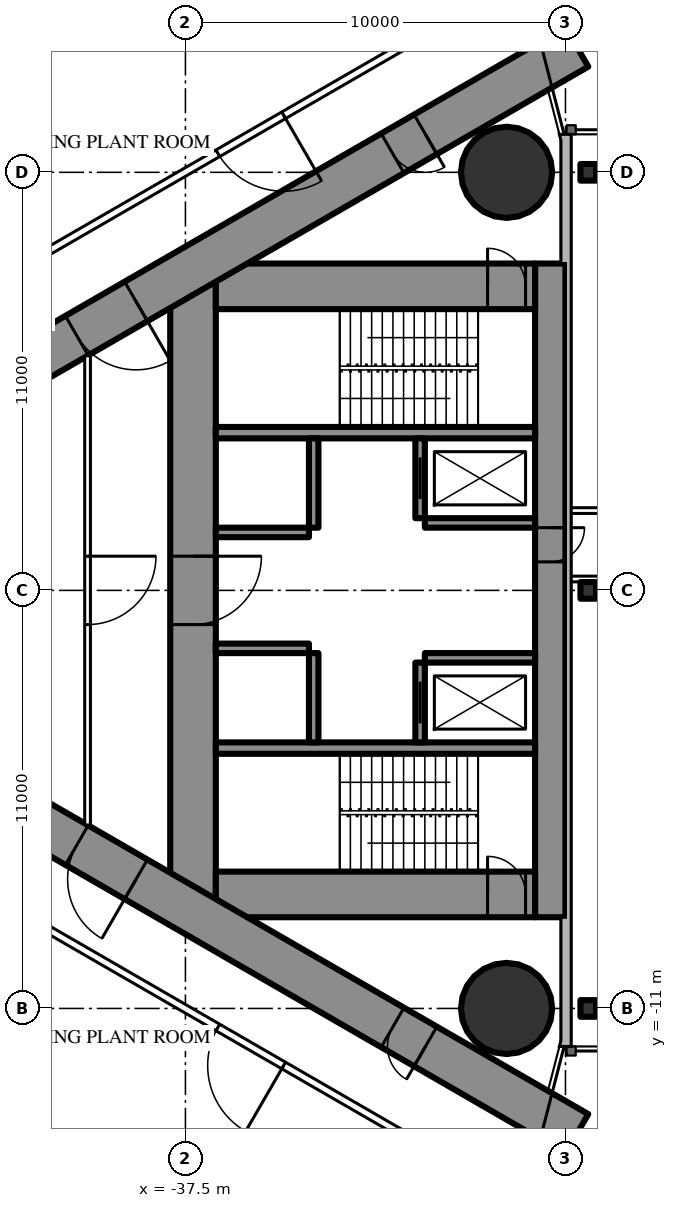
"""IFC4 building model, lengths in metres.
Left out: names, types, materials, properties, quantities, classifications, styles, units other than length and angle.
Written with IfcOpenShell. Run it as: python <this file> out.ifc"""

import sys

from ifc_helpers import new_model, si_unit, direction, frame, frame_2d, origin, origin_2d, place, context, subcontext, project, spatial, rectangle, circle, i_section, extrude, element, fill, save


model = new_model("IFC4")
c1 = context("Model", 3, precision=1e-05, world=origin(), true_north=direction((0.0, 1.0)))
c2 = subcontext(c1, "Body", "Model", "MODEL_VIEW")
j1 = project(units=[si_unit("LENGTHUNIT", "METRE"), si_unit("PLANEANGLEUNIT", "RADIAN")], contexts=[c1])
p1 = place(None, origin())
s1 = spatial("IfcSite", under=j1, at=p1, CompositionType="ELEMENT")
p2 = place(p1, origin())
s2 = spatial("IfcBuilding", under=s1, at=p2, CompositionType="ELEMENT")
p3 = place(p2, frame((0.0, 0.0, 263.3)))
s3 = spatial("IfcBuildingStorey", under=s2, at=p3, CompositionType="ELEMENT", Elevation=263.3)
for number, where, z_axis, x_axis in (
    (1, (-29.05, -11.0, 0.0), (0.0, 0.0, 1.0), (1.0, 0.0, 0.0)),
    (2, (-29.05, 11.0, 0.0), (0.0, 0.0, 1.0), (1.0, 0.0, 0.0)),
):
    element("IfcColumn", number, at=place(p3, frame(where, z_axis=z_axis, x_axis=x_axis)), inside=s3, PredefinedType="COLUMN", context=c2, shape_type="SweptSolid", body=[
        extrude(circle(Radius=1.2, at=origin_2d()), origin(), (0.0, 0.0, 1.0), 5.0),
    ])
p4 = place(p3, frame((-27.9, 8.6, 0.0), z_axis=(0.0, 0.0, 1.0), x_axis=(0.0, -1.0, 0.0)))
e3 = element("IfcWall", 3, at=p4, inside=s3, PredefinedType="SHEAR", context=c2, shape_type="SweptSolid", body=[
    extrude(rectangle(XDim=17.2, YDim=0.8, at=frame_2d((8.6, 0.0))), origin(), (0.0, 0.0, 1.0), 5.0),
])
p5 = place(p4, frame((6.95, 0.0, 0.0)))
e4 = element("IfcOpeningElement", 4, at=p5, cuts=e3, PredefinedType="OPENING", context=c2, shape_type="SweptSolid", body=[
    extrude(rectangle(XDim=0.9, YDim=2.2, at=frame_2d((0.45, 1.1))), frame((0.0, 0.41, 0.0), z_axis=(0.0, -1.0, 0.0), x_axis=(1.0, 0.0, 0.0)), (0.0, 0.0, 1.0), 0.82),
])
p6 = place(p3, frame((-37.3, 8.6, 0.0), z_axis=(0.0, 0.0, 1.0), x_axis=(0.0, -1.0, 0.0)))
e5 = element("IfcWall", 5, at=p6, inside=s3, PredefinedType="SHEAR", context=c2, shape_type="SweptSolid", body=[
    extrude(rectangle(XDim=17.2, YDim=1.2, at=frame_2d((8.6, 0.0))), origin(), (0.0, 0.0, 1.0), 5.0),
])
p7 = place(p6, frame((7.7, 0.0, 0.0)))
e6 = element("IfcOpeningElement", 6, at=p7, cuts=e5, PredefinedType="OPENING", context=c2, shape_type="SweptSolid", body=[
    extrude(rectangle(XDim=1.8, YDim=2.2, at=frame_2d((0.9, 1.1))), frame((0.0, 0.61, 0.0), z_axis=(0.0, -1.0, 0.0), x_axis=(1.0, 0.0, 0.0)), (0.0, 0.0, 1.0), 1.22),
])
p8 = place(p3, frame((-28.3, 8.0, 0.0), z_axis=(0.0, 0.0, 1.0), x_axis=(-1.0, 0.0, 0.0)))
e7 = element("IfcWall", 7, at=p8, inside=s3, PredefinedType="SHEAR", context=c2, shape_type="SweptSolid", body=[
    extrude(rectangle(XDim=8.4, YDim=1.2, at=frame_2d((4.2, 0.0))), origin(), (0.0, 0.0, 1.0), 5.0),
])
p9 = place(p8, frame((0.25, 0.0, 0.0)))
e8 = element("IfcOpeningElement", 8, at=p9, cuts=e7, PredefinedType="OPENING", context=c2, shape_type="SweptSolid", body=[
    extrude(rectangle(XDim=1.0, YDim=2.2, at=frame_2d((0.5, 1.1))), frame((0.0, 0.61, 0.0), z_axis=(0.0, -1.0, 0.0), x_axis=(1.0, 0.0, 0.0)), (0.0, 0.0, 1.0), 1.22),
])
p10 = place(p3, frame((-28.3, -8.0, 0.0), z_axis=(0.0, 0.0, 1.0), x_axis=(-1.0, 0.0, 0.0)))
e9 = element("IfcWall", 9, at=p10, inside=s3, PredefinedType="SHEAR", context=c2, shape_type="SweptSolid", body=[
    extrude(rectangle(XDim=8.4, YDim=1.2, at=frame_2d((4.2, 0.0))), origin(), (0.0, 0.0, 1.0), 5.0),
])
p11 = place(p10, frame((0.25, 0.0, 0.0)))
e10 = element("IfcOpeningElement", 10, at=p11, cuts=e9, PredefinedType="OPENING", context=c2, shape_type="SweptSolid", body=[
    extrude(rectangle(XDim=1.0, YDim=2.2, at=frame_2d((0.5, 1.1))), frame((0.0, 0.61, 0.0), z_axis=(0.0, -1.0, 0.0), x_axis=(1.0, 0.0, 0.0)), (0.0, 0.0, 1.0), 1.22),
])
for number, where, z_axis, x_axis in (
    (11, (-28.3, 4.15, 0.0), (0.0, 0.0, 1.0), (-1.0, 0.0, 0.0)),
    (12, (-28.3, -4.15, 0.0), (0.0, 0.0, 1.0), (-1.0, 0.0, 0.0)),
):
    element("IfcWall", number, at=place(p3, frame(where, z_axis=z_axis, x_axis=x_axis)), inside=s3, PredefinedType="SHEAR", context=c2, shape_type="SweptSolid", body=[
        extrude(rectangle(XDim=8.4, YDim=0.3, at=frame_2d((4.2, 0.0))), origin(), (0.0, 0.0, 1.0), 5.0),
    ])
p12 = place(p3, frame((-31.325, 4.0, 0.0), z_axis=(0.0, 0.0, 1.0), x_axis=(0.0, -1.0, 0.0)))
e13 = element("IfcWall", 13, at=p12, inside=s3, PredefinedType="SHEAR", context=c2, shape_type="SweptSolid", body=[
    extrude(rectangle(XDim=2.1, YDim=0.25, at=frame_2d((1.05, 0.0))), origin(), (0.0, 0.0, 1.0), 5.0),
])
p13 = place(p12, frame((0.5, 0.0, 0.0)))
e14 = element("IfcOpeningElement", 14, at=p13, cuts=e13, PredefinedType="OPENING", context=c2, shape_type="SweptSolid", body=[
    extrude(rectangle(XDim=1.1, YDim=2.2, at=frame_2d((0.55, 1.1))), frame((0.0, 0.135, 0.0), z_axis=(0.0, -1.0, 0.0), x_axis=(1.0, 0.0, 0.0)), (0.0, 0.0, 1.0), 0.27),
])
p14 = place(p3, frame((-34.125, 4.0, 0.0), z_axis=(0.0, 0.0, 1.0), x_axis=(0.0, -1.0, 0.0)))
e15 = element("IfcWall", 15, at=p14, inside=s3, PredefinedType="SHEAR", context=c2, shape_type="SweptSolid", body=[
    extrude(rectangle(XDim=2.35, YDim=0.25, at=frame_2d((1.175, 0.0))), origin(), (0.0, 0.0, 1.0), 5.0),
])
p15 = place(p3, frame((-28.3, 1.775, 0.0), z_axis=(0.0, 0.0, 1.0), x_axis=(-1.0, 0.0, 0.0)))
e16 = element("IfcWall", 16, at=p15, inside=s3, PredefinedType="SHEAR", context=c2, shape_type="SweptSolid", body=[
    extrude(rectangle(XDim=2.9, YDim=0.25, at=frame_2d((1.45, 0.0))), origin(), (0.0, 0.0, 1.0), 5.0),
])
p16 = place(p3, frame((-34.25, 1.525, 0.0), z_axis=(0.0, 0.0, 1.0), x_axis=(-1.0, 0.0, 0.0)))
e17 = element("IfcWall", 17, at=p16, inside=s3, PredefinedType="SHEAR", context=c2, shape_type="SweptSolid", body=[
    extrude(rectangle(XDim=2.45, YDim=0.25, at=frame_2d((1.225, 0.0))), origin(), (0.0, 0.0, 1.0), 5.0),
])
p17 = place(p3, frame((-31.325, -1.9, 0.0), z_axis=(0.0, 0.0, 1.0), x_axis=(0.0, -1.0, 0.0)))
e18 = element("IfcWall", 18, at=p17, inside=s3, PredefinedType="SHEAR", context=c2, shape_type="SweptSolid", body=[
    extrude(rectangle(XDim=2.1, YDim=0.25, at=frame_2d((1.05, 0.0))), origin(), (0.0, 0.0, 1.0), 5.0),
])
p18 = place(p17, frame((0.5, 0.0, 0.0)))
e19 = element("IfcOpeningElement", 19, at=p18, cuts=e18, PredefinedType="OPENING", context=c2, shape_type="SweptSolid", body=[
    extrude(rectangle(XDim=1.1, YDim=2.2, at=frame_2d((0.55, 1.1))), frame((0.0, 0.135, 0.0), z_axis=(0.0, -1.0, 0.0), x_axis=(1.0, 0.0, 0.0)), (0.0, 0.0, 1.0), 0.27),
])
p19 = place(p3, frame((-34.125, -1.65, 0.0), z_axis=(0.0, 0.0, 1.0), x_axis=(0.0, -1.0, 0.0)))
e20 = element("IfcWall", 20, at=p19, inside=s3, PredefinedType="SHEAR", context=c2, shape_type="SweptSolid", body=[
    extrude(rectangle(XDim=2.35, YDim=0.25, at=frame_2d((1.175, 0.0))), origin(), (0.0, 0.0, 1.0), 5.0),
])
p20 = place(p3, frame((-28.3, -1.775, 0.0), z_axis=(0.0, 0.0, 1.0), x_axis=(-1.0, 0.0, 0.0)))
e21 = element("IfcWall", 21, at=p20, inside=s3, PredefinedType="SHEAR", context=c2, shape_type="SweptSolid", body=[
    extrude(rectangle(XDim=2.9, YDim=0.25, at=frame_2d((1.45, 0.0))), origin(), (0.0, 0.0, 1.0), 5.0),
])
p21 = place(p3, frame((-34.25, -1.525, 0.0), z_axis=(0.0, 0.0, 1.0), x_axis=(-1.0, 0.0, 0.0)))
e22 = element("IfcWall", 22, at=p21, inside=s3, PredefinedType="SHEAR", context=c2, shape_type="SweptSolid", body=[
    extrude(rectangle(XDim=2.45, YDim=0.25, at=frame_2d((1.225, 0.0))), origin(), (0.0, 0.0, 1.0), 5.0),
])
p22 = place(p3, frame((-27.2, 14.3, 0.0), z_axis=(0.0, 0.0, 1.0), x_axis=(-0.866026593062, -0.499997940104, 0.0)))
e23 = element("IfcWall", 23, at=p22, inside=s3, PredefinedType="SHEAR", context=c2, shape_type="SweptSolid", body=[
    extrude(rectangle(XDim=28.946, YDim=1.2, at=frame_2d((14.473, 0.0))), origin(), (0.0, 0.0, 1.0), 5.0),
])
p23 = place(p22, frame((4.6, 0.0, 0.0)))
e24 = element("IfcOpeningElement", 24, at=p23, cuts=e23, PredefinedType="OPENING", context=c2, shape_type="SweptSolid", body=[
    extrude(rectangle(XDim=1.0, YDim=2.2, at=frame_2d((0.5, 1.1))), frame((0.0, 0.61, 0.0), z_axis=(0.0, -1.0, 0.0), x_axis=(1.0, 0.0, 0.0)), (0.0, 0.0, 1.0), 1.22),
])
p24 = place(p22, frame((13.395, 0.0, 0.0)))
e25 = element("IfcOpeningElement", 25, at=p24, cuts=e23, PredefinedType="OPENING", context=c2, shape_type="SweptSolid", body=[
    extrude(rectangle(XDim=1.8, YDim=2.2, at=frame_2d((0.9, 1.1))), frame((0.0, 0.61, 0.0), z_axis=(0.0, -1.0, 0.0), x_axis=(1.0, 0.0, 0.0)), (0.0, 0.0, 1.0), 1.22),
])
p25 = place(p3, frame((-27.2, -14.3, 0.0), z_axis=(0.0, 0.0, 1.0), x_axis=(-0.866024021859, 0.500002393557, 0.0)))
e26 = element("IfcWall", 26, at=p25, inside=s3, PredefinedType="SHEAR", context=c2, shape_type="SweptSolid", body=[
    extrude(rectangle(XDim=27.907, YDim=1.2, at=frame_2d((13.954, 0.0))), origin(), (0.0, 0.0, 1.0), 5.0),
])
p26 = place(p25, frame((4.6, 0.0, 0.0)))
e27 = element("IfcOpeningElement", 27, at=p26, cuts=e26, PredefinedType="OPENING", context=c2, shape_type="SweptSolid", body=[
    extrude(rectangle(XDim=1.0, YDim=2.2, at=frame_2d((0.5, 1.1))), frame((0.0, 0.61, 0.0), z_axis=(0.0, -1.0, 0.0), x_axis=(1.0, 0.0, 0.0)), (0.0, 0.0, 1.0), 1.22),
])
p27 = place(p25, frame((13.395, 0.0, 0.0)))
e28 = element("IfcOpeningElement", 28, at=p27, cuts=e26, PredefinedType="OPENING", context=c2, shape_type="SweptSolid", body=[
    extrude(rectangle(XDim=1.8, YDim=2.2, at=frame_2d((0.9, 1.1))), frame((0.0, 0.61, 0.0), z_axis=(0.0, -1.0, 0.0), x_axis=(1.0, 0.0, 0.0)), (0.0, 0.0, 1.0), 1.22),
])
for number, where, z_axis, x_axis in (
    (29, (-26.9, -11.0, 0.0), (0.0, 0.0, 1.0), (1.0, 0.0, 0.0)),
    (30, (-26.9, 0.0, 0.0), (0.0, 0.0, 1.0), (1.0, 0.0, 0.0)),
    (31, (-26.9, 11.0, 0.0), (0.0, 0.0, 1.0), (1.0, 0.0, 0.0)),
):
    element("IfcColumn", number, at=place(p3, frame(where, z_axis=z_axis, x_axis=x_axis)), inside=s3, PredefinedType="COLUMN", context=c2, shape_type="SweptSolid", body=[
        extrude(i_section(OverallWidth=0.412, OverallDepth=0.437, WebThickness=0.036, FlangeThickness=0.058, FilletRadius=0.015, at=origin_2d()), origin(), (0.0, 0.0, 1.0), 5.0),
    ])
p28 = place(p3, frame((-28.737, 16.068, 0.0), z_axis=(0.0, 0.0, 1.0), x_axis=(-0.866026057212, -0.499998868229, 0.0)))
e32 = element("IfcWall", 32, at=p28, inside=s3, PredefinedType="PARTITIONING", context=c2, shape_type="SweptSolid", body=[
    extrude(rectangle(XDim=32.137, YDim=0.2, at=frame_2d((16.068, 0.0))), origin(), (0.0, 0.0, 1.0), 4.75),
])
p29 = place(p28, frame((7.134, 0.0, 0.0)))
e33 = element("IfcOpeningElement", 33, at=p29, cuts=e32, PredefinedType="OPENING", context=c2, shape_type="SweptSolid", body=[
    extrude(rectangle(XDim=2.0, YDim=2.4, at=frame_2d((1.0, 1.2))), frame((0.0, 0.11, 0.0), z_axis=(0.0, -1.0, 0.0), x_axis=(1.0, 0.0, 0.0)), (0.0, 0.0, 1.0), 0.22),
])
p30 = place(p28, frame((17.117, 0.0, 0.0)))
e34 = element("IfcOpeningElement", 34, at=p30, cuts=e32, PredefinedType="OPENING", context=c2, shape_type="SweptSolid", body=[
    extrude(rectangle(XDim=2.0, YDim=2.4, at=frame_2d((1.0, 1.2))), frame((0.0, 0.11, 0.0), z_axis=(0.0, -1.0, 0.0), x_axis=(1.0, 0.0, 0.0)), (0.0, 0.0, 1.0), 0.22),
])
p31 = place(p28, frame((21.266, 0.0, 0.0)))
e35 = element("IfcOpeningElement", 35, at=p31, cuts=e32, PredefinedType="OPENING", context=c2, shape_type="SweptSolid", body=[
    extrude(rectangle(XDim=2.0, YDim=2.4, at=frame_2d((1.0, 1.2))), frame((0.0, 0.11, 0.0), z_axis=(0.0, -1.0, 0.0), x_axis=(1.0, 0.0, 0.0)), (0.0, 0.0, 1.0), 0.22),
])
p32 = place(p28, frame((27.126, 0.0, 0.0)))
e36 = element("IfcOpeningElement", 36, at=p32, cuts=e32, PredefinedType="OPENING", context=c2, shape_type="SweptSolid", body=[
    extrude(rectangle(XDim=2.0, YDim=2.4, at=frame_2d((1.0, 1.2))), frame((0.0, 0.11, 0.0), z_axis=(0.0, -1.0, 0.0), x_axis=(1.0, 0.0, 0.0)), (0.0, 0.0, 1.0), 0.22),
])
p33 = place(p3, frame((-28.737, -16.068, 0.0), z_axis=(0.0, 0.0, 1.0), x_axis=(-0.866026220747, 0.499998584977, 0.0)))
e37 = element("IfcWall", 37, at=p33, inside=s3, PredefinedType="PARTITIONING", context=c2, shape_type="SweptSolid", body=[
    extrude(rectangle(XDim=32.017, YDim=0.2, at=frame_2d((16.008, 0.0))), origin(), (0.0, 0.0, 1.0), 4.75),
])
p34 = place(p33, frame((27.066, 0.0, 0.0)))
e38 = element("IfcOpeningElement", 38, at=p34, cuts=e37, PredefinedType="OPENING", context=c2, shape_type="SweptSolid", body=[
    extrude(rectangle(XDim=2.0, YDim=2.4, at=frame_2d((1.0, 1.2))), frame((0.0, 0.11, 0.0), z_axis=(0.0, -1.0, 0.0), x_axis=(1.0, 0.0, 0.0)), (0.0, 0.0, 1.0), 0.22),
])
p35 = place(p33, frame((21.266, 0.0, 0.0)))
e39 = element("IfcOpeningElement", 39, at=p35, cuts=e37, PredefinedType="OPENING", context=c2, shape_type="SweptSolid", body=[
    extrude(rectangle(XDim=2.0, YDim=2.4, at=frame_2d((1.0, 1.2))), frame((0.0, 0.11, 0.0), z_axis=(0.0, -1.0, 0.0), x_axis=(1.0, 0.0, 0.0)), (0.0, 0.0, 1.0), 0.22),
])
p36 = place(p33, frame((17.117, 0.0, 0.0)))
e40 = element("IfcOpeningElement", 40, at=p36, cuts=e37, PredefinedType="OPENING", context=c2, shape_type="SweptSolid", body=[
    extrude(rectangle(XDim=2.0, YDim=2.4, at=frame_2d((1.0, 1.2))), frame((0.0, 0.11, 0.0), z_axis=(0.0, -1.0, 0.0), x_axis=(1.0, 0.0, 0.0)), (0.0, 0.0, 1.0), 0.22),
])
p37 = place(p33, frame((7.134, 0.0, 0.0)))
e41 = element("IfcOpeningElement", 41, at=p37, cuts=e37, PredefinedType="OPENING", context=c2, shape_type="SweptSolid", body=[
    extrude(rectangle(XDim=2.0, YDim=2.4, at=frame_2d((1.0, 1.2))), frame((0.0, 0.11, 0.0), z_axis=(0.0, -1.0, 0.0), x_axis=(1.0, 0.0, 0.0)), (0.0, 0.0, 1.0), 0.22),
])
p38 = place(p3, frame((-40.075, 6.174, 0.0), z_axis=(0.0, 0.0, 1.0), x_axis=(0.0, -1.0, 0.0)))
e42 = element("IfcWall", 42, at=p38, inside=s3, PredefinedType="PARTITIONING", context=c2, shape_type="SweptSolid", body=[
    extrude(rectangle(XDim=12.348, YDim=0.15, at=frame_2d((6.174, 0.0))), origin(), (0.0, 0.0, 1.0), 4.75),
])
p39 = place(p38, frame((5.274, 0.0, 0.0)))
e43 = element("IfcOpeningElement", 43, at=p39, cuts=e42, PredefinedType="OPENING", context=c2, shape_type="SweptSolid", body=[
    extrude(rectangle(XDim=1.8, YDim=2.2, at=frame_2d((0.9, 1.1))), frame((0.0, 0.085, 0.0), z_axis=(0.0, -1.0, 0.0), x_axis=(1.0, 0.0, 0.0)), (0.0, 0.0, 1.0), 0.17),
])
p40 = place(p3, frame((-27.5, 0.3, 0.0), z_axis=(0.0, 0.0, 1.0), x_axis=(1.0, 0.0, 0.0)))
e44 = element("IfcWall", 44, at=p40, inside=s3, PredefinedType="PARTITIONING", context=c2, shape_type="SweptSolid", body=[
    extrude(rectangle(XDim=55.0, YDim=0.15, at=frame_2d((27.5, 0.0))), origin(), (0.0, 0.0, 1.0), 3.8),
])
p41 = place(p40, frame((7.25, 0.0, 0.0)))
e45 = element("IfcOpeningElement", 45, at=p41, cuts=e44, PredefinedType="OPENING", context=c2, shape_type="SweptSolid", body=[
    extrude(rectangle(XDim=2.0, YDim=2.4, at=frame_2d((1.0, 1.2))), frame((0.0, 0.085, 0.0), z_axis=(0.0, -1.0, 0.0), x_axis=(1.0, 0.0, 0.0)), (0.0, 0.0, 1.0), 0.17),
])
p42 = place(p40, frame((29.25, 0.0, 0.0)))
e46 = element("IfcOpeningElement", 46, at=p42, cuts=e44, PredefinedType="OPENING", context=c2, shape_type="SweptSolid", body=[
    extrude(rectangle(XDim=2.0, YDim=2.4, at=frame_2d((1.0, 1.2))), frame((0.0, 0.085, 0.0), z_axis=(0.0, -1.0, 0.0), x_axis=(1.0, 0.0, 0.0)), (0.0, 0.0, 1.0), 0.17),
])
p43 = place(p40, frame((45.75, 0.0, 0.0)))
e47 = element("IfcOpeningElement", 47, at=p43, cuts=e44, PredefinedType="OPENING", context=c2, shape_type="SweptSolid", body=[
    extrude(rectangle(XDim=2.0, YDim=2.4, at=frame_2d((1.0, 1.2))), frame((0.0, 0.085, 0.0), z_axis=(0.0, -1.0, 0.0), x_axis=(1.0, 0.0, 0.0)), (0.0, 0.0, 1.0), 0.17),
])
p44 = place(p3, frame((-27.5, 2.1, 0.0), z_axis=(0.0, 0.0, 1.0), x_axis=(1.0, 0.0, 0.0)))
e48 = element("IfcWall", 48, at=p44, inside=s3, PredefinedType="PARTITIONING", context=c2, shape_type="SweptSolid", body=[
    extrude(rectangle(XDim=55.0, YDim=0.15, at=frame_2d((27.5, 0.0))), origin(), (0.0, 0.0, 1.0), 4.8),
])
p45 = place(p44, frame((7.25, 0.0, 0.0)))
e49 = element("IfcOpeningElement", 49, at=p45, cuts=e48, PredefinedType="OPENING", context=c2, shape_type="SweptSolid", body=[
    extrude(rectangle(XDim=2.0, YDim=2.4, at=frame_2d((1.0, 1.2))), frame((0.0, 0.085, 0.0), z_axis=(0.0, -1.0, 0.0), x_axis=(1.0, 0.0, 0.0)), (0.0, 0.0, 1.0), 0.17),
])
p46 = place(p44, frame((29.25, 0.0, 0.0)))
e50 = element("IfcOpeningElement", 50, at=p46, cuts=e48, PredefinedType="OPENING", context=c2, shape_type="SweptSolid", body=[
    extrude(rectangle(XDim=2.0, YDim=2.4, at=frame_2d((1.0, 1.2))), frame((0.0, 0.085, 0.0), z_axis=(0.0, -1.0, 0.0), x_axis=(1.0, 0.0, 0.0)), (0.0, 0.0, 1.0), 0.17),
])
p47 = place(p44, frame((45.75, 0.0, 0.0)))
e51 = element("IfcOpeningElement", 51, at=p47, cuts=e48, PredefinedType="OPENING", context=c2, shape_type="SweptSolid", body=[
    extrude(rectangle(XDim=2.0, YDim=2.4, at=frame_2d((1.0, 1.2))), frame((0.0, 0.085, 0.0), z_axis=(0.0, -1.0, 0.0), x_axis=(1.0, 0.0, 0.0)), (0.0, 0.0, 1.0), 0.17),
])
p48 = place(p29, origin())
e52 = element("IfcDoor", 52, at=p48, inside=s3, OperationType="DOUBLE_DOOR_SINGLE_SWING", PredefinedType="DOOR", context=c2, shape_type="SweptSolid", body=[
    extrude(rectangle(XDim=2.0, YDim=2.4, at=frame_2d((1.0, 1.2))), frame((0.0, 0.025, 0.0), z_axis=(0.0, -1.0, 0.0), x_axis=(1.0, 0.0, 0.0)), (0.0, 0.0, 1.0), 0.05),
])
fill(e33, e52)
p49 = place(p37, origin())
e53 = element("IfcDoor", 53, at=p49, inside=s3, OperationType="DOUBLE_DOOR_SINGLE_SWING", PredefinedType="DOOR", context=c2, shape_type="SweptSolid", body=[
    extrude(rectangle(XDim=2.0, YDim=2.4, at=frame_2d((1.0, 1.2))), frame((0.0, 0.025, 0.0), z_axis=(0.0, -1.0, 0.0), x_axis=(1.0, 0.0, 0.0)), (0.0, 0.0, 1.0), 0.05),
])
fill(e41, e53)
p50 = place(p39, origin())
e54 = element("IfcDoor", 54, at=p50, inside=s3, OperationType="DOUBLE_DOOR_SINGLE_SWING", PredefinedType="DOOR", context=c2, shape_type="SweptSolid", body=[
    extrude(rectangle(XDim=1.8, YDim=2.2, at=frame_2d((0.9, 1.1))), frame((0.0, 0.025, 0.0), z_axis=(0.0, -1.0, 0.0), x_axis=(1.0, 0.0, 0.0)), (0.0, 0.0, 1.0), 0.05),
])
fill(e43, e54)
p51 = place(p23, origin())
e55 = element("IfcDoor", 55, at=p51, inside=s3, OperationType="SINGLE_SWING_LEFT", PredefinedType="DOOR", context=c2, shape_type="SweptSolid", body=[
    extrude(rectangle(XDim=1.0, YDim=2.2, at=frame_2d((0.5, 1.1))), frame((0.0, 0.025, 0.0), z_axis=(0.0, -1.0, 0.0), x_axis=(1.0, 0.0, 0.0)), (0.0, 0.0, 1.0), 0.05),
])
fill(e24, e55)
p52 = place(p24, origin())
e56 = element("IfcDoor", 56, at=p52, inside=s3, OperationType="DOUBLE_DOOR_SINGLE_SWING", PredefinedType="DOOR", context=c2, shape_type="SweptSolid", body=[
    extrude(rectangle(XDim=1.8, YDim=2.2, at=frame_2d((0.9, 1.1))), frame((0.0, 0.025, 0.0), z_axis=(0.0, -1.0, 0.0), x_axis=(1.0, 0.0, 0.0)), (0.0, 0.0, 1.0), 0.05),
])
fill(e25, e56)
p53 = place(p26, origin())
e57 = element("IfcDoor", 57, at=p53, inside=s3, OperationType="SINGLE_SWING_LEFT", PredefinedType="DOOR", context=c2, shape_type="SweptSolid", body=[
    extrude(rectangle(XDim=1.0, YDim=2.2, at=frame_2d((0.5, 1.1))), frame((0.0, 0.025, 0.0), z_axis=(0.0, -1.0, 0.0), x_axis=(1.0, 0.0, 0.0)), (0.0, 0.0, 1.0), 0.05),
])
fill(e27, e57)
p54 = place(p27, origin())
e58 = element("IfcDoor", 58, at=p54, inside=s3, OperationType="DOUBLE_DOOR_SINGLE_SWING", PredefinedType="DOOR", context=c2, shape_type="SweptSolid", body=[
    extrude(rectangle(XDim=1.8, YDim=2.2, at=frame_2d((0.9, 1.1))), frame((0.0, 0.025, 0.0), z_axis=(0.0, -1.0, 0.0), x_axis=(1.0, 0.0, 0.0)), (0.0, 0.0, 1.0), 0.05),
])
fill(e28, e58)
p55 = place(p7, origin())
e59 = element("IfcDoor", 59, at=p55, inside=s3, OperationType="DOUBLE_DOOR_SINGLE_SWING", PredefinedType="DOOR", context=c2, shape_type="SweptSolid", body=[
    extrude(rectangle(XDim=1.8, YDim=2.2, at=frame_2d((0.9, 1.1))), frame((0.0, 0.025, 0.0), z_axis=(0.0, -1.0, 0.0), x_axis=(1.0, 0.0, 0.0)), (0.0, 0.0, 1.0), 0.05),
])
fill(e6, e59)
p56 = place(p9, origin())
e60 = element("IfcDoor", 60, at=p56, inside=s3, OperationType="SINGLE_SWING_RIGHT", PredefinedType="DOOR", context=c2, shape_type="SweptSolid", body=[
    extrude(rectangle(XDim=1.0, YDim=2.2, at=frame_2d((0.5, 1.1))), frame((0.0, 0.025, 0.0), z_axis=(0.0, -1.0, 0.0), x_axis=(1.0, 0.0, 0.0)), (0.0, 0.0, 1.0), 0.05),
])
fill(e8, e60)
p57 = place(p11, origin())
e61 = element("IfcDoor", 61, at=p57, inside=s3, OperationType="SINGLE_SWING_RIGHT", PredefinedType="DOOR", context=c2, shape_type="SweptSolid", body=[
    extrude(rectangle(XDim=1.0, YDim=2.2, at=frame_2d((0.5, 1.1))), frame((0.0, 0.025, 0.0), z_axis=(0.0, -1.0, 0.0), x_axis=(1.0, 0.0, 0.0)), (0.0, 0.0, 1.0), 0.05),
])
fill(e10, e61)
p58 = place(p5, origin())
e62 = element("IfcDoor", 62, at=p58, inside=s3, OperationType="SINGLE_SWING_LEFT", PredefinedType="DOOR", context=c2, shape_type="SweptSolid", body=[
    extrude(rectangle(XDim=0.9, YDim=2.2, at=frame_2d((0.45, 1.1))), frame((0.0, 0.025, 0.0), z_axis=(0.0, -1.0, 0.0), x_axis=(1.0, 0.0, 0.0)), (0.0, 0.0, 1.0), 0.05),
])
fill(e4, e62)
p59 = place(p13, origin())
e63 = element("IfcDoor", 63, at=p59, inside=s3, OperationType="SLIDING_TO_LEFT", PredefinedType="USERDEFINED", context=c2, shape_type="SweptSolid", body=[
    extrude(rectangle(XDim=1.1, YDim=2.2, at=frame_2d((0.55, 1.1))), frame((0.0, 0.025, 0.0), z_axis=(0.0, -1.0, 0.0), x_axis=(1.0, 0.0, 0.0)), (0.0, 0.0, 1.0), 0.05),
])
fill(e14, e63)
p60 = place(p18, origin())
e64 = element("IfcDoor", 64, at=p60, inside=s3, OperationType="SLIDING_TO_LEFT", PredefinedType="USERDEFINED", context=c2, shape_type="SweptSolid", body=[
    extrude(rectangle(XDim=1.1, YDim=2.2, at=frame_2d((0.55, 1.1))), frame((0.0, 0.025, 0.0), z_axis=(0.0, -1.0, 0.0), x_axis=(1.0, 0.0, 0.0)), (0.0, 0.0, 1.0), 0.05),
])
fill(e19, e64)
save(model, sys.argv[1])
